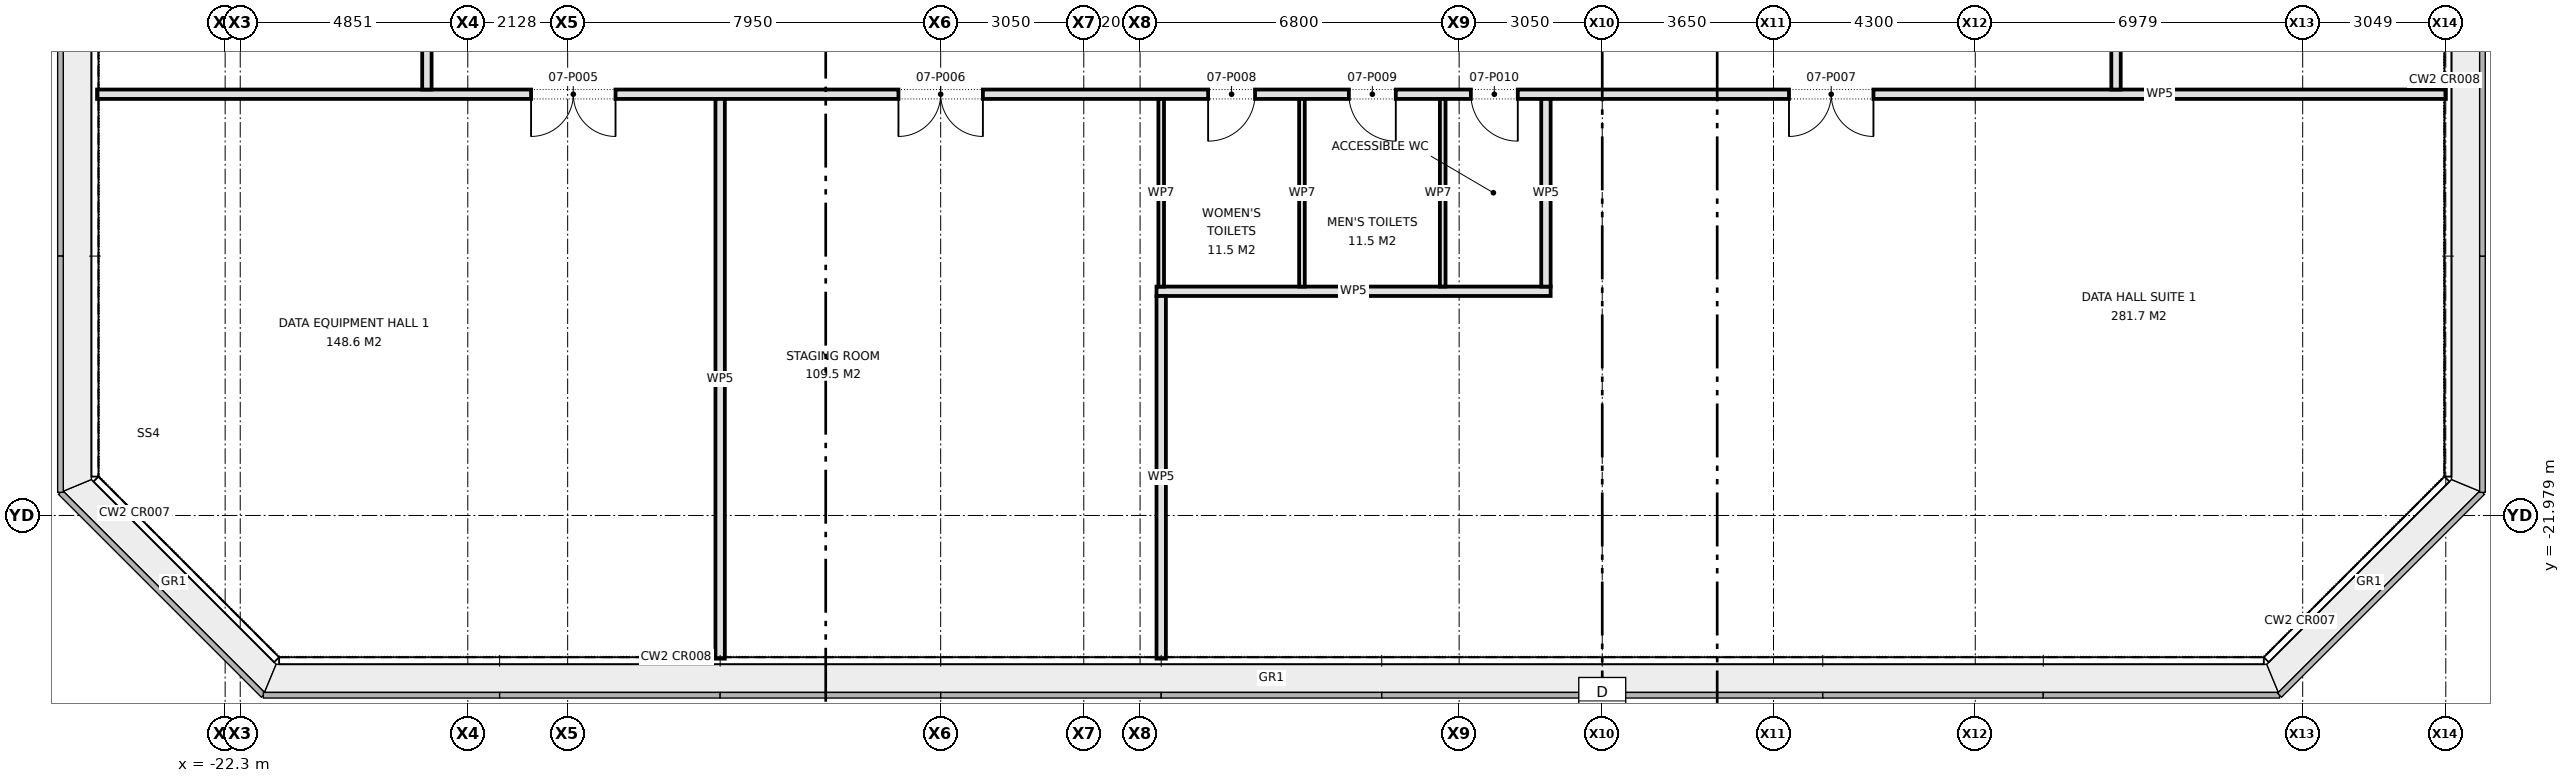
"""IFC4 building model, lengths in metres.
Left out: names, types, materials, properties, quantities, classifications, styles, units other than length and angle.
Written with IfcOpenShell. Run it as: python <this file> out.ifc"""

import sys

from ifc_helpers import new_model, si_unit, direction, frame, frame_2d, origin, place, context, subcontext, project, spatial, rectangle, extrude, element, fill, save


model = new_model("IFC4")
c1 = context("Model", 3, precision=1e-05, world=origin(), true_north=direction((0.0, 1.0)))
c2 = subcontext(c1, "Body", "Model", "MODEL_VIEW")
j1 = project(units=[si_unit("LENGTHUNIT", "METRE"), si_unit("PLANEANGLEUNIT", "RADIAN")], contexts=[c1])
p1 = place(None, origin())
s1 = spatial("IfcSite", under=j1, at=p1, CompositionType="ELEMENT")
p2 = place(p1, origin())
s2 = spatial("IfcBuilding", under=s1, at=p2, CompositionType="ELEMENT")
p3 = place(p2, frame((0.0, 0.0, 30.5)))
s3 = spatial("IfcBuildingStorey", under=s2, at=p3, CompositionType="ELEMENT", Elevation=30.5)
p4 = place(p3, frame((-2.45, -17.2, 0.0), z_axis=(0.0, 0.0, 1.0), x_axis=(1.0, 0.0, 0.0)))
e1 = element("IfcWall", 1, at=p4, inside=s3, PredefinedType="PARTITIONING", context=c2, shape_type="SweptSolid", body=[
    extrude(rectangle(XDim=8.4, YDim=0.2, at=frame_2d((4.2, 0.0))), origin(), (0.0, 0.0, 1.0), 4.575),
])
p5 = place(p3, frame((-25.03, -13.0, 0.0), z_axis=(0.0, 0.0, 1.0), x_axis=(1.0, 0.0, 0.0)))
e2 = element("IfcWall", 2, at=p5, inside=s3, PredefinedType="PARTITIONING", context=c2, shape_type="SweptSolid", body=[
    extrude(rectangle(XDim=50.06, YDim=0.2, at=frame_2d((25.03, 0.0))), origin(), (0.0, 0.0, 1.0), 4.575),
])
p6 = place(p5, frame((9.25, 0.0, 0.0)))
e3 = element("IfcOpeningElement", 3, at=p6, cuts=e2, PredefinedType="OPENING", context=c2, shape_type="SweptSolid", body=[
    extrude(rectangle(XDim=1.8, YDim=2.1, at=frame_2d((0.9, 1.05))), frame((0.0, 0.11, 0.0), z_axis=(0.0, -1.0, 0.0), x_axis=(1.0, 0.0, 0.0)), (0.0, 0.0, 1.0), 0.22),
])
p7 = place(p5, frame((17.08, 0.0, 0.0)))
e4 = element("IfcOpeningElement", 4, at=p7, cuts=e2, PredefinedType="OPENING", context=c2, shape_type="SweptSolid", body=[
    extrude(rectangle(XDim=1.8, YDim=2.1, at=frame_2d((0.9, 1.05))), frame((0.0, 0.11, 0.0), z_axis=(0.0, -1.0, 0.0), x_axis=(1.0, 0.0, 0.0)), (0.0, 0.0, 1.0), 0.22),
])
p8 = place(p5, frame((36.06, 0.0, 0.0)))
e5 = element("IfcOpeningElement", 5, at=p8, cuts=e2, PredefinedType="OPENING", context=c2, shape_type="SweptSolid", body=[
    extrude(rectangle(XDim=1.8, YDim=2.1, at=frame_2d((0.9, 1.05))), frame((0.0, 0.11, 0.0), z_axis=(0.0, -1.0, 0.0), x_axis=(1.0, 0.0, 0.0)), (0.0, 0.0, 1.0), 0.22),
])
p9 = place(p5, frame((23.68, 0.0, 0.0)))
e6 = element("IfcOpeningElement", 6, at=p9, cuts=e2, PredefinedType="OPENING", context=c2, shape_type="SweptSolid", body=[
    extrude(rectangle(XDim=1.0, YDim=2.1, at=frame_2d((0.5, 1.05))), frame((0.0, 0.11, 0.0), z_axis=(0.0, -1.0, 0.0), x_axis=(1.0, 0.0, 0.0)), (0.0, 0.0, 1.0), 0.22),
])
p10 = place(p5, frame((26.68, 0.0, 0.0)))
e7 = element("IfcOpeningElement", 7, at=p10, cuts=e2, PredefinedType="OPENING", context=c2, shape_type="SweptSolid", body=[
    extrude(rectangle(XDim=1.0, YDim=2.1, at=frame_2d((0.5, 1.05))), frame((0.0, 0.11, 0.0), z_axis=(0.0, -1.0, 0.0), x_axis=(1.0, 0.0, 0.0)), (0.0, 0.0, 1.0), 0.22),
])
p11 = place(p5, frame((29.28, 0.0, 0.0)))
e8 = element("IfcOpeningElement", 8, at=p11, cuts=e2, PredefinedType="OPENING", context=c2, shape_type="SweptSolid", body=[
    extrude(rectangle(XDim=1.0, YDim=2.1, at=frame_2d((0.5, 1.05))), frame((0.0, 0.11, 0.0), z_axis=(0.0, -1.0, 0.0), x_axis=(1.0, 0.0, 0.0)), (0.0, 0.0, 1.0), 0.22),
])
p12 = place(p3, frame((18.0, -12.9, 0.0), z_axis=(0.0, 0.0, 1.0), x_axis=(0.0, 1.0, 0.0)))
e9 = element("IfcWall", 9, at=p12, inside=s3, PredefinedType="PARTITIONING", context=c2, shape_type="SweptSolid", body=[
    extrude(rectangle(XDim=25.8, YDim=0.2, at=frame_2d((12.9, 0.0))), origin(), (0.0, 0.0, 1.0), 4.575),
])
p13 = place(p12, frame((4.725, 0.0, 0.0)))
e10 = element("IfcOpeningElement", 10, at=p13, cuts=e9, PredefinedType="OPENING", context=c2, shape_type="SweptSolid", body=[
    extrude(rectangle(XDim=1.0, YDim=2.1, at=frame_2d((0.5, 1.05))), frame((0.0, 0.11, 0.0), z_axis=(0.0, -1.0, 0.0), x_axis=(1.0, 0.0, 0.0)), (0.0, 0.0, 1.0), 0.22),
])
p14 = place(p12, frame((14.65, 0.0, 0.0)))
e11 = element("IfcOpeningElement", 11, at=p14, cuts=e9, PredefinedType="OPENING", context=c2, shape_type="SweptSolid", body=[
    extrude(rectangle(XDim=1.2, YDim=2.1, at=frame_2d((0.6, 1.05))), frame((0.0, 0.11, 0.0), z_axis=(0.0, -1.0, 0.0), x_axis=(1.0, 0.0, 0.0)), (0.0, 0.0, 1.0), 0.22),
])
p15 = place(p12, frame((22.025, 0.0, 0.0)))
e12 = element("IfcOpeningElement", 12, at=p15, cuts=e9, PredefinedType="OPENING", context=c2, shape_type="SweptSolid", body=[
    extrude(rectangle(XDim=1.8, YDim=2.1, at=frame_2d((0.9, 1.05))), frame((0.0, 0.11, 0.0), z_axis=(0.0, -1.0, 0.0), x_axis=(1.0, 0.0, 0.0)), (0.0, 0.0, 1.0), 0.22),
])
p16 = place(p3, frame((5.85, -17.1, 0.0), z_axis=(0.0, 0.0, 1.0), x_axis=(0.0, 1.0, 0.0)))
e13 = element("IfcWall", 13, at=p16, inside=s3, PredefinedType="PARTITIONING", context=c2, shape_type="SweptSolid", body=[
    extrude(rectangle(XDim=4.0, YDim=0.2, at=frame_2d((2.0, 0.0))), origin(), (0.0, 0.0, 1.0), 4.575),
])
p17 = place(p3, frame((-2.35, -25.03, 0.0), z_axis=(0.0, 0.0, 1.0), x_axis=(0.0, 1.0, 0.0)))
e14 = element("IfcWall", 14, at=p17, inside=s3, PredefinedType="PARTITIONING", context=c2, shape_type="SweptSolid", body=[
    extrude(rectangle(XDim=7.73, YDim=0.2, at=frame_2d((3.865, 0.0))), origin(), (0.0, 0.0, 1.0), 4.575),
])
p18 = place(p3, frame((-11.75, -25.03, 0.0), z_axis=(0.0, 0.0, 1.0), x_axis=(0.0, 1.0, 0.0)))
e15 = element("IfcWall", 15, at=p18, inside=s3, PredefinedType="PARTITIONING", context=c2, shape_type="SweptSolid", body=[
    extrude(rectangle(XDim=11.93, YDim=0.2, at=frame_2d((5.965, 0.0))), origin(), (0.0, 0.0, 1.0), 4.575),
])
p19 = place(p3, frame((-18.0, -12.9, 0.0), z_axis=(0.0, 0.0, 1.0), x_axis=(0.0, 1.0, 0.0)))
e16 = element("IfcWall", 16, at=p19, inside=s3, PredefinedType="PARTITIONING", context=c2, shape_type="SweptSolid", body=[
    extrude(rectangle(XDim=30.3, YDim=0.2, at=frame_2d((15.15, 0.0))), origin(), (0.0, 0.0, 1.0), 4.575),
])
p20 = place(p19, frame((6.675, 0.0, 0.0)))
e17 = element("IfcOpeningElement", 17, at=p20, cuts=e16, PredefinedType="OPENING", context=c2, shape_type="SweptSolid", body=[
    extrude(rectangle(XDim=1.8, YDim=2.1, at=frame_2d((0.9, 1.05))), frame((0.0, 0.11, 0.0), z_axis=(0.0, -1.0, 0.0), x_axis=(1.0, 0.0, 0.0)), (0.0, 0.0, 1.0), 0.22),
])
p21 = place(p19, frame((19.675, 0.0, 0.0)))
e18 = element("IfcOpeningElement", 18, at=p21, cuts=e16, PredefinedType="OPENING", context=c2, shape_type="SweptSolid", body=[
    extrude(rectangle(XDim=1.8, YDim=2.1, at=frame_2d((0.9, 1.05))), frame((0.0, 0.11, 0.0), z_axis=(0.0, -1.0, 0.0), x_axis=(1.0, 0.0, 0.0)), (0.0, 0.0, 1.0), 0.22),
])
for number, where, z_axis, x_axis in (
    (19, (3.65, -17.1, 0.0), (0.0, 0.0, 1.0), (0.0, 1.0, 0.0)),
    (20, (0.65, -17.1, 0.0), (0.0, 0.0, 1.0), (0.0, 1.0, 0.0)),
    (21, (-2.35, -17.1, 0.0), (0.0, 0.0, 1.0), (0.0, 1.0, 0.0)),
):
    element("IfcWall", number, at=place(p3, frame(where, z_axis=z_axis, x_axis=x_axis)), inside=s3, PredefinedType="PARTITIONING", context=c2, shape_type="SweptSolid", body=[
        extrude(rectangle(XDim=4.0, YDim=0.12, at=frame_2d((2.0, 0.0))), origin(), (0.0, 0.0, 1.0), 4.575),
    ])
p22 = place(p6, frame((1.8, 0.0, 0.0), z_axis=(0.0, 0.0, 1.0), x_axis=(-1.0, 0.0, 0.0)))
e22 = element("IfcDoor", 22, at=p22, inside=s3, OperationType="DOUBLE_DOOR_SINGLE_SWING", PredefinedType="DOOR", context=c2, shape_type="SweptSolid", body=[
    extrude(rectangle(XDim=1.8, YDim=2.1, at=frame_2d((0.9, 1.05))), frame((0.0, 0.025, 0.0), z_axis=(0.0, -1.0, 0.0), x_axis=(1.0, 0.0, 0.0)), (0.0, 0.0, 1.0), 0.05),
])
fill(e3, e22)
p23 = place(p7, frame((1.8, 0.0, 0.0), z_axis=(0.0, 0.0, 1.0), x_axis=(-1.0, 0.0, 0.0)))
e23 = element("IfcDoor", 23, at=p23, inside=s3, OperationType="DOUBLE_DOOR_SINGLE_SWING", PredefinedType="DOOR", context=c2, shape_type="SweptSolid", body=[
    extrude(rectangle(XDim=1.8, YDim=2.1, at=frame_2d((0.9, 1.05))), frame((0.0, 0.025, 0.0), z_axis=(0.0, -1.0, 0.0), x_axis=(1.0, 0.0, 0.0)), (0.0, 0.0, 1.0), 0.05),
])
fill(e4, e23)
p24 = place(p8, frame((1.8, 0.0, 0.0), z_axis=(0.0, 0.0, 1.0), x_axis=(-1.0, 0.0, 0.0)))
e24 = element("IfcDoor", 24, at=p24, inside=s3, OperationType="DOUBLE_DOOR_SINGLE_SWING", PredefinedType="DOOR", context=c2, shape_type="SweptSolid", body=[
    extrude(rectangle(XDim=1.8, YDim=2.1, at=frame_2d((0.9, 1.05))), frame((0.0, 0.025, 0.0), z_axis=(0.0, -1.0, 0.0), x_axis=(1.0, 0.0, 0.0)), (0.0, 0.0, 1.0), 0.05),
])
fill(e5, e24)
p25 = place(p9, frame((1.0, 0.0, 0.0), z_axis=(0.0, 0.0, 1.0), x_axis=(-1.0, 0.0, 0.0)))
e25 = element("IfcDoor", 25, at=p25, inside=s3, OperationType="SINGLE_SWING_RIGHT", PredefinedType="DOOR", context=c2, shape_type="SweptSolid", body=[
    extrude(rectangle(XDim=1.0, YDim=2.1, at=frame_2d((0.5, 1.05))), frame((0.0, 0.025, 0.0), z_axis=(0.0, -1.0, 0.0), x_axis=(1.0, 0.0, 0.0)), (0.0, 0.0, 1.0), 0.05),
])
fill(e6, e25)
p26 = place(p10, frame((1.0, 0.0, 0.0), z_axis=(0.0, 0.0, 1.0), x_axis=(-1.0, 0.0, 0.0)))
e26 = element("IfcDoor", 26, at=p26, inside=s3, OperationType="SINGLE_SWING_LEFT", PredefinedType="DOOR", context=c2, shape_type="SweptSolid", body=[
    extrude(rectangle(XDim=1.0, YDim=2.1, at=frame_2d((0.5, 1.05))), frame((0.0, 0.025, 0.0), z_axis=(0.0, -1.0, 0.0), x_axis=(1.0, 0.0, 0.0)), (0.0, 0.0, 1.0), 0.05),
])
fill(e7, e26)
p27 = place(p11, frame((1.0, 0.0, 0.0), z_axis=(0.0, 0.0, 1.0), x_axis=(-1.0, 0.0, 0.0)))
e27 = element("IfcDoor", 27, at=p27, inside=s3, OperationType="SINGLE_SWING_LEFT", PredefinedType="DOOR", context=c2, shape_type="SweptSolid", body=[
    extrude(rectangle(XDim=1.0, YDim=2.1, at=frame_2d((0.5, 1.05))), frame((0.0, 0.025, 0.0), z_axis=(0.0, -1.0, 0.0), x_axis=(1.0, 0.0, 0.0)), (0.0, 0.0, 1.0), 0.05),
])
fill(e8, e27)
save(model, sys.argv[1])
